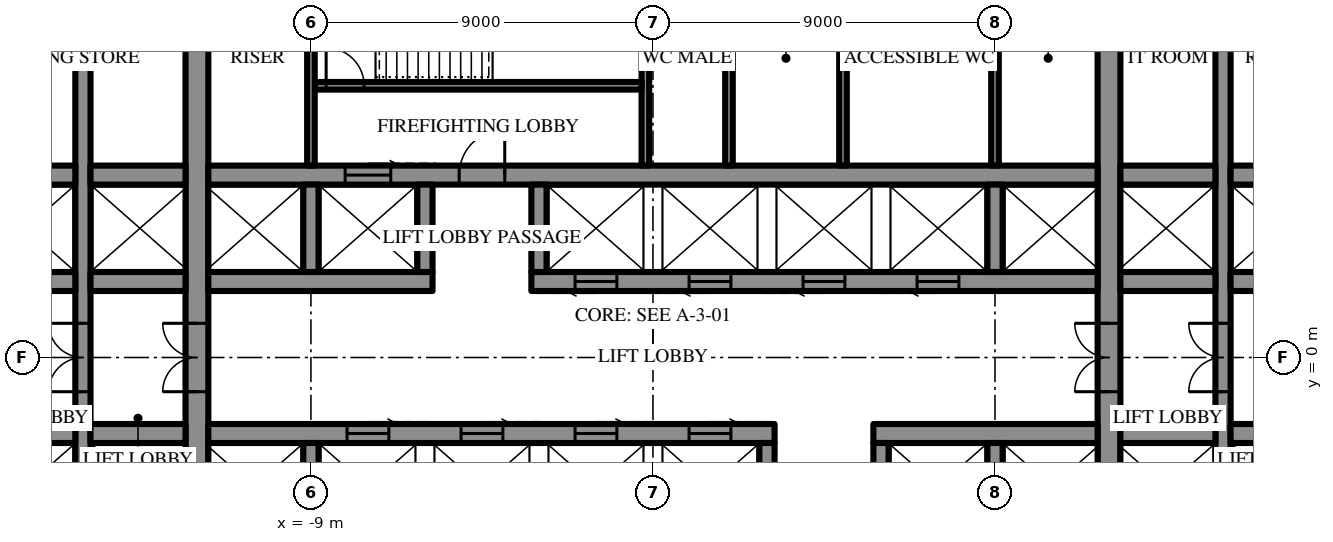
"""IFC4 building model, lengths in metres.
Left out: names, types, materials, properties, quantities, classifications, styles, units other than length and angle.
Written with IfcOpenShell. Run it as: python <this file> out.ifc"""

import sys

from ifc_helpers import new_model, si_unit, direction, frame, frame_2d, origin, place, context, subcontext, project, spatial, rectangle, extrude, element, fill, save


model = new_model("IFC4")
c1 = context("Model", 3, precision=1e-05, world=origin(), true_north=direction((0.0, 1.0)))
c2 = subcontext(c1, "Body", "Model", "MODEL_VIEW")
j1 = project(units=[si_unit("LENGTHUNIT", "METRE"), si_unit("PLANEANGLEUNIT", "RADIAN")], contexts=[c1])
p1 = place(None, origin())
s1 = spatial("IfcSite", under=j1, at=p1, CompositionType="ELEMENT")
p2 = place(p1, origin())
s2 = spatial("IfcBuilding", under=s1, at=p2, CompositionType="ELEMENT")
p3 = place(p2, frame((0.0, 0.0, 65.5)))
s3 = spatial("IfcBuildingStorey", under=s2, at=p3, CompositionType="ELEMENT", Elevation=65.5)
p4 = place(p3, frame((12.0, -10.7, 0.0), z_axis=(0.0, 0.0, 1.0), x_axis=(0.0, 1.0, 0.0)))
e1 = element("IfcWall", 1, at=p4, inside=s3, PredefinedType="SHEAR", context=c2, shape_type="SweptSolid", body=[
    extrude(rectangle(XDim=21.4, YDim=0.6, at=frame_2d((10.7, 0.0))), origin(), (0.0, 0.0, 1.0), 4.2),
])
p5 = place(p4, frame((9.8, 0.0, 0.0)))
e2 = element("IfcOpeningElement", 2, at=p5, cuts=e1, PredefinedType="OPENING", context=c2, shape_type="SweptSolid", body=[
    extrude(rectangle(XDim=1.8, YDim=2.4, at=frame_2d((0.9, 1.2))), frame((0.0, 0.31, 0.0), z_axis=(0.0, -1.0, 0.0), x_axis=(1.0, 0.0, 0.0)), (0.0, 0.0, 1.0), 0.62),
])
p6 = place(p3, frame((-12.0, -10.7, 0.0), z_axis=(0.0, 0.0, 1.0), x_axis=(0.0, 1.0, 0.0)))
e3 = element("IfcWall", 3, at=p6, inside=s3, PredefinedType="SHEAR", context=c2, shape_type="SweptSolid", body=[
    extrude(rectangle(XDim=21.4, YDim=0.6, at=frame_2d((10.7, 0.0))), origin(), (0.0, 0.0, 1.0), 4.2),
])
p7 = place(p6, frame((9.8, 0.0, 0.0)))
e4 = element("IfcOpeningElement", 4, at=p7, cuts=e3, PredefinedType="OPENING", context=c2, shape_type="SweptSolid", body=[
    extrude(rectangle(XDim=1.8, YDim=2.4, at=frame_2d((0.9, 1.2))), frame((0.0, 0.31, 0.0), z_axis=(0.0, -1.0, 0.0), x_axis=(1.0, 0.0, 0.0)), (0.0, 0.0, 1.0), 0.62),
])
p8 = place(p3, frame((15.0, -10.7, 0.0), z_axis=(0.0, 0.0, 1.0), x_axis=(0.0, 1.0, 0.0)))
e5 = element("IfcWall", 5, at=p8, inside=s3, PredefinedType="SHEAR", context=c2, shape_type="SweptSolid", body=[
    extrude(rectangle(XDim=21.4, YDim=0.4, at=frame_2d((10.7, 0.0))), origin(), (0.0, 0.0, 1.0), 4.2),
])
p9 = place(p8, frame((9.8, 0.0, 0.0)))
e6 = element("IfcOpeningElement", 6, at=p9, cuts=e5, PredefinedType="OPENING", context=c2, shape_type="SweptSolid", body=[
    extrude(rectangle(XDim=1.8, YDim=2.4, at=frame_2d((0.9, 1.2))), frame((0.0, 0.21, 0.0), z_axis=(0.0, -1.0, 0.0), x_axis=(1.0, 0.0, 0.0)), (0.0, 0.0, 1.0), 0.42),
])
p10 = place(p3, frame((-15.0, -10.7, 0.0), z_axis=(0.0, 0.0, 1.0), x_axis=(0.0, 1.0, 0.0)))
e7 = element("IfcWall", 7, at=p10, inside=s3, PredefinedType="SHEAR", context=c2, shape_type="SweptSolid", body=[
    extrude(rectangle(XDim=21.4, YDim=0.4, at=frame_2d((10.7, 0.0))), origin(), (0.0, 0.0, 1.0), 4.2),
])
p11 = place(p10, frame((9.8, 0.0, 0.0)))
e8 = element("IfcOpeningElement", 8, at=p11, cuts=e7, PredefinedType="OPENING", context=c2, shape_type="SweptSolid", body=[
    extrude(rectangle(XDim=1.8, YDim=2.4, at=frame_2d((0.9, 1.2))), frame((0.0, 0.21, 0.0), z_axis=(0.0, -1.0, 0.0), x_axis=(1.0, 0.0, 0.0)), (0.0, 0.0, 1.0), 0.42),
])
p12 = place(p3, frame((-17.4, 2.0, 0.0), z_axis=(0.0, 0.0, 1.0), x_axis=(1.0, 0.0, 0.0)))
e9 = element("IfcWall", 9, at=p12, inside=s3, PredefinedType="SHEAR", context=c2, shape_type="SweptSolid", body=[
    extrude(rectangle(XDim=2.2, YDim=0.5, at=frame_2d((1.1, 0.0))), origin(), (0.0, 0.0, 1.0), 4.2),
])
p13 = place(p3, frame((-14.8, 2.0, 0.0), z_axis=(0.0, 0.0, 1.0), x_axis=(1.0, 0.0, 0.0)))
e10 = element("IfcWall", 10, at=p13, inside=s3, PredefinedType="SHEAR", context=c2, shape_type="SweptSolid", body=[
    extrude(rectangle(XDim=2.5, YDim=0.5, at=frame_2d((1.25, 0.0))), origin(), (0.0, 0.0, 1.0), 4.2),
])
p14 = place(p3, frame((-11.7, 2.0, 0.0), z_axis=(0.0, 0.0, 1.0), x_axis=(1.0, 0.0, 0.0)))
e11 = element("IfcWall", 11, at=p14, inside=s3, PredefinedType="SHEAR", context=c2, shape_type="SweptSolid", body=[
    extrude(rectangle(XDim=5.9, YDim=0.5, at=frame_2d((2.95, 0.0))), origin(), (0.0, 0.0, 1.0), 4.2),
])
p15 = place(p3, frame((-3.2, 2.0, 0.0), z_axis=(0.0, 0.0, 1.0), x_axis=(1.0, 0.0, 0.0)))
e12 = element("IfcWall", 12, at=p15, inside=s3, PredefinedType="SHEAR", context=c2, shape_type="SweptSolid", body=[
    extrude(rectangle(XDim=14.9, YDim=0.5, at=frame_2d((7.45, 0.0))), origin(), (0.0, 0.0, 1.0), 4.2),
])
p16 = place(p15, frame((1.15, 0.0, 0.0)))
e13 = element("IfcOpeningElement", 13, at=p16, cuts=e12, PredefinedType="OPENING", context=c2, shape_type="SweptSolid", body=[
    extrude(rectangle(XDim=1.1, YDim=2.2, at=frame_2d((0.55, 1.1))), frame((0.0, 0.26, 0.0), z_axis=(0.0, -1.0, 0.0), x_axis=(1.0, 0.0, 0.0)), (0.0, 0.0, 1.0), 0.52),
])
p17 = place(p15, frame((4.15, 0.0, 0.0)))
e14 = element("IfcOpeningElement", 14, at=p17, cuts=e12, PredefinedType="OPENING", context=c2, shape_type="SweptSolid", body=[
    extrude(rectangle(XDim=1.1, YDim=2.2, at=frame_2d((0.55, 1.1))), frame((0.0, 0.26, 0.0), z_axis=(0.0, -1.0, 0.0), x_axis=(1.0, 0.0, 0.0)), (0.0, 0.0, 1.0), 0.52),
])
p18 = place(p15, frame((7.15, 0.0, 0.0)))
e15 = element("IfcOpeningElement", 15, at=p18, cuts=e12, PredefinedType="OPENING", context=c2, shape_type="SweptSolid", body=[
    extrude(rectangle(XDim=1.1, YDim=2.2, at=frame_2d((0.55, 1.1))), frame((0.0, 0.26, 0.0), z_axis=(0.0, -1.0, 0.0), x_axis=(1.0, 0.0, 0.0)), (0.0, 0.0, 1.0), 0.52),
])
p19 = place(p15, frame((10.15, 0.0, 0.0)))
e16 = element("IfcOpeningElement", 16, at=p19, cuts=e12, PredefinedType="OPENING", context=c2, shape_type="SweptSolid", body=[
    extrude(rectangle(XDim=1.1, YDim=2.2, at=frame_2d((0.55, 1.1))), frame((0.0, 0.26, 0.0), z_axis=(0.0, -1.0, 0.0), x_axis=(1.0, 0.0, 0.0)), (0.0, 0.0, 1.0), 0.52),
])
p20 = place(p3, frame((12.3, 2.0, 0.0), z_axis=(0.0, 0.0, 1.0), x_axis=(1.0, 0.0, 0.0)))
e17 = element("IfcWall", 17, at=p20, inside=s3, PredefinedType="SHEAR", context=c2, shape_type="SweptSolid", body=[
    extrude(rectangle(XDim=2.5, YDim=0.5, at=frame_2d((1.25, 0.0))), origin(), (0.0, 0.0, 1.0), 4.2),
])
for number, where, z_axis, x_axis in (
    (18, (15.2, 2.0, 0.0), (0.0, 0.0, 1.0), (1.0, 0.0, 0.0)),
    (19, (-17.4, 4.8, 0.0), (0.0, 0.0, 1.0), (1.0, 0.0, 0.0)),
):
    element("IfcWall", number, at=place(p3, frame(where, z_axis=z_axis, x_axis=x_axis)), inside=s3, PredefinedType="SHEAR", context=c2, shape_type="SweptSolid", body=[
        extrude(rectangle(XDim=2.2, YDim=0.5, at=frame_2d((1.1, 0.0))), origin(), (0.0, 0.0, 1.0), 4.2),
    ])
p21 = place(p3, frame((-14.8, 4.8, 0.0), z_axis=(0.0, 0.0, 1.0), x_axis=(1.0, 0.0, 0.0)))
e20 = element("IfcWall", 20, at=p21, inside=s3, PredefinedType="SHEAR", context=c2, shape_type="SweptSolid", body=[
    extrude(rectangle(XDim=2.5, YDim=0.5, at=frame_2d((1.25, 0.0))), origin(), (0.0, 0.0, 1.0), 4.2),
])
p22 = place(p3, frame((-11.7, 4.8, 0.0), z_axis=(0.0, 0.0, 1.0), x_axis=(1.0, 0.0, 0.0)))
e21 = element("IfcWall", 21, at=p22, inside=s3, PredefinedType="SHEAR", context=c2, shape_type="SweptSolid", body=[
    extrude(rectangle(XDim=23.4, YDim=0.5, at=frame_2d((11.7, 0.0))), origin(), (0.0, 0.0, 1.0), 4.2),
])
p23 = place(p22, frame((6.6, 0.0, 0.0)))
e22 = element("IfcOpeningElement", 22, at=p23, cuts=e21, PredefinedType="OPENING", context=c2, shape_type="SweptSolid", body=[
    extrude(rectangle(XDim=1.2, YDim=2.2, at=frame_2d((0.6, 1.1))), frame((0.0, 0.26, 0.0), z_axis=(0.0, -1.0, 0.0), x_axis=(1.0, 0.0, 0.0)), (0.0, 0.0, 1.0), 0.52),
])
p24 = place(p22, frame((3.6, 0.0, 0.0)))
e23 = element("IfcOpeningElement", 23, at=p24, cuts=e21, PredefinedType="OPENING", context=c2, shape_type="SweptSolid", body=[
    extrude(rectangle(XDim=1.2, YDim=2.2, at=frame_2d((0.6, 1.1))), frame((0.0, 0.26, 0.0), z_axis=(0.0, -1.0, 0.0), x_axis=(1.0, 0.0, 0.0)), (0.0, 0.0, 1.0), 0.52),
])
p25 = place(p3, frame((12.3, 4.8, 0.0), z_axis=(0.0, 0.0, 1.0), x_axis=(1.0, 0.0, 0.0)))
e24 = element("IfcWall", 24, at=p25, inside=s3, PredefinedType="SHEAR", context=c2, shape_type="SweptSolid", body=[
    extrude(rectangle(XDim=2.5, YDim=0.5, at=frame_2d((1.25, 0.0))), origin(), (0.0, 0.0, 1.0), 4.2),
])
p26 = place(p3, frame((15.2, 4.8, 0.0), z_axis=(0.0, 0.0, 1.0), x_axis=(1.0, 0.0, 0.0)))
e25 = element("IfcWall", 25, at=p26, inside=s3, PredefinedType="SHEAR", context=c2, shape_type="SweptSolid", body=[
    extrude(rectangle(XDim=2.2, YDim=0.5, at=frame_2d((1.1, 0.0))), origin(), (0.0, 0.0, 1.0), 4.2),
])
for number, where, z_axis, x_axis in (
    (26, (-9.0, 2.25, 0.0), (0.0, 0.0, 1.0), (0.0, 1.0, 0.0)),
    (27, (-6.0, 2.25, 0.0), (0.0, 0.0, 1.0), (0.0, 1.0, 0.0)),
    (28, (-3.0, 2.25, 0.0), (0.0, 0.0, 1.0), (0.0, 1.0, 0.0)),
    (29, (9.0, 2.25, 0.0), (0.0, 0.0, 1.0), (0.0, 1.0, 0.0)),
):
    element("IfcWall", number, at=place(p3, frame(where, z_axis=z_axis, x_axis=x_axis)), inside=s3, PredefinedType="SHEAR", context=c2, shape_type="SweptSolid", body=[
        extrude(rectangle(XDim=2.3, YDim=0.4, at=frame_2d((1.15, 0.0))), origin(), (0.0, 0.0, 1.0), 4.2),
    ])
p27 = place(p3, frame((-0.2, 5.05, 0.0), z_axis=(0.0, 0.0, 1.0), x_axis=(0.0, 1.0, 0.0)))
e30 = element("IfcWall", 30, at=p27, inside=s3, PredefinedType="SHEAR", context=c2, shape_type="SweptSolid", body=[
    extrude(rectangle(XDim=5.65, YDim=0.2, at=frame_2d((2.825, 0.0))), origin(), (0.0, 0.0, 1.0), 4.2),
])
p28 = place(p3, frame((-8.9, 7.15, 0.0), z_axis=(0.0, 0.0, 1.0), x_axis=(1.0, 0.0, 0.0)))
e31 = element("IfcWall", 31, at=p28, inside=s3, PredefinedType="SHEAR", context=c2, shape_type="SweptSolid", body=[
    extrude(rectangle(XDim=8.6, YDim=0.2, at=frame_2d((4.3, 0.0))), origin(), (0.0, 0.0, 1.0), 4.2),
])
p29 = place(p28, frame((0.3, 0.0, 0.0)))
e32 = element("IfcOpeningElement", 32, at=p29, cuts=e31, PredefinedType="OPENING", context=c2, shape_type="SweptSolid", body=[
    extrude(rectangle(XDim=1.0, YDim=2.2, at=frame_2d((0.5, 1.1))), frame((0.0, 0.11, 0.0), z_axis=(0.0, -1.0, 0.0), x_axis=(1.0, 0.0, 0.0)), (0.0, 0.0, 1.0), 0.22),
])
p30 = place(p3, frame((17.4, -2.0, 0.0), z_axis=(0.0, 0.0, 1.0), x_axis=(-1.0, 0.0, 0.0)))
e33 = element("IfcWall", 33, at=p30, inside=s3, PredefinedType="SHEAR", context=c2, shape_type="SweptSolid", body=[
    extrude(rectangle(XDim=2.2, YDim=0.5, at=frame_2d((1.1, 0.0))), origin(), (0.0, 0.0, 1.0), 4.2),
])
p31 = place(p3, frame((14.8, -2.0, 0.0), z_axis=(0.0, 0.0, 1.0), x_axis=(-1.0, 0.0, 0.0)))
e34 = element("IfcWall", 34, at=p31, inside=s3, PredefinedType="SHEAR", context=c2, shape_type="SweptSolid", body=[
    extrude(rectangle(XDim=2.5, YDim=0.5, at=frame_2d((1.25, 0.0))), origin(), (0.0, 0.0, 1.0), 4.2),
])
p32 = place(p3, frame((11.7, -2.0, 0.0), z_axis=(0.0, 0.0, 1.0), x_axis=(-1.0, 0.0, 0.0)))
e35 = element("IfcWall", 35, at=p32, inside=s3, PredefinedType="SHEAR", context=c2, shape_type="SweptSolid", body=[
    extrude(rectangle(XDim=5.9, YDim=0.5, at=frame_2d((2.95, 0.0))), origin(), (0.0, 0.0, 1.0), 4.2),
])
p33 = place(p3, frame((3.2, -2.0, 0.0), z_axis=(0.0, 0.0, 1.0), x_axis=(-1.0, 0.0, 0.0)))
e36 = element("IfcWall", 36, at=p33, inside=s3, PredefinedType="SHEAR", context=c2, shape_type="SweptSolid", body=[
    extrude(rectangle(XDim=14.9, YDim=0.5, at=frame_2d((7.45, 0.0))), origin(), (0.0, 0.0, 1.0), 4.2),
])
p34 = place(p33, frame((1.15, 0.0, 0.0)))
e37 = element("IfcOpeningElement", 37, at=p34, cuts=e36, PredefinedType="OPENING", context=c2, shape_type="SweptSolid", body=[
    extrude(rectangle(XDim=1.1, YDim=2.2, at=frame_2d((0.55, 1.1))), frame((0.0, 0.26, 0.0), z_axis=(0.0, -1.0, 0.0), x_axis=(1.0, 0.0, 0.0)), (0.0, 0.0, 1.0), 0.52),
])
p35 = place(p33, frame((4.15, 0.0, 0.0)))
e38 = element("IfcOpeningElement", 38, at=p35, cuts=e36, PredefinedType="OPENING", context=c2, shape_type="SweptSolid", body=[
    extrude(rectangle(XDim=1.1, YDim=2.2, at=frame_2d((0.55, 1.1))), frame((0.0, 0.26, 0.0), z_axis=(0.0, -1.0, 0.0), x_axis=(1.0, 0.0, 0.0)), (0.0, 0.0, 1.0), 0.52),
])
p36 = place(p33, frame((7.15, 0.0, 0.0)))
e39 = element("IfcOpeningElement", 39, at=p36, cuts=e36, PredefinedType="OPENING", context=c2, shape_type="SweptSolid", body=[
    extrude(rectangle(XDim=1.1, YDim=2.2, at=frame_2d((0.55, 1.1))), frame((0.0, 0.26, 0.0), z_axis=(0.0, -1.0, 0.0), x_axis=(1.0, 0.0, 0.0)), (0.0, 0.0, 1.0), 0.52),
])
p37 = place(p33, frame((10.15, 0.0, 0.0)))
e40 = element("IfcOpeningElement", 40, at=p37, cuts=e36, PredefinedType="OPENING", context=c2, shape_type="SweptSolid", body=[
    extrude(rectangle(XDim=1.1, YDim=2.2, at=frame_2d((0.55, 1.1))), frame((0.0, 0.26, 0.0), z_axis=(0.0, -1.0, 0.0), x_axis=(1.0, 0.0, 0.0)), (0.0, 0.0, 1.0), 0.52),
])
p38 = place(p3, frame((-12.3, -2.0, 0.0), z_axis=(0.0, 0.0, 1.0), x_axis=(-1.0, 0.0, 0.0)))
e41 = element("IfcWall", 41, at=p38, inside=s3, PredefinedType="SHEAR", context=c2, shape_type="SweptSolid", body=[
    extrude(rectangle(XDim=2.5, YDim=0.5, at=frame_2d((1.25, 0.0))), origin(), (0.0, 0.0, 1.0), 4.2),
])
p39 = place(p3, frame((-15.2, -2.0, 0.0), z_axis=(0.0, 0.0, 1.0), x_axis=(-1.0, 0.0, 0.0)))
e42 = element("IfcWall", 42, at=p39, inside=s3, PredefinedType="SHEAR", context=c2, shape_type="SweptSolid", body=[
    extrude(rectangle(XDim=2.2, YDim=0.5, at=frame_2d((1.1, 0.0))), origin(), (0.0, 0.0, 1.0), 4.2),
])
for number, where, z_axis, x_axis in (
    (43, (9.0, -2.25, 0.0), (0.0, 0.0, 1.0), (0.0, -1.0, 0.0)),
    (44, (6.0, -2.25, 0.0), (0.0, 0.0, 1.0), (0.0, -1.0, 0.0)),
    (45, (3.0, -2.25, 0.0), (0.0, 0.0, 1.0), (0.0, -1.0, 0.0)),
    (46, (-9.0, -2.25, 0.0), (0.0, 0.0, 1.0), (0.0, -1.0, 0.0)),
):
    element("IfcWall", number, at=place(p3, frame(where, z_axis=z_axis, x_axis=x_axis)), inside=s3, PredefinedType="SHEAR", context=c2, shape_type="SweptSolid", body=[
        extrude(rectangle(XDim=2.3, YDim=0.4, at=frame_2d((1.15, 0.0))), origin(), (0.0, 0.0, 1.0), 4.2),
    ])
for number, where, z_axis, x_axis in (
    (47, (-9.0, 5.05, 0.0), (0.0, 0.0, 1.0), (0.0, 1.0, 0.0)),
    (48, (9.0, 5.05, 0.0), (0.0, 0.0, 1.0), (0.0, 1.0, 0.0)),
    (49, (2.0, 5.05, 0.0), (0.0, 0.0, 1.0), (0.0, 1.0, 0.0)),
    (50, (5.0, 5.05, 0.0), (0.0, 0.0, 1.0), (0.0, 1.0, 0.0)),
):
    element("IfcWall", number, at=place(p3, frame(where, z_axis=z_axis, x_axis=x_axis)), inside=s3, PredefinedType="PARTITIONING", context=c2, shape_type="SweptSolid", body=[
        extrude(rectangle(XDim=5.65, YDim=0.2, at=frame_2d((2.825, 0.0))), origin(), (0.0, 0.0, 1.0), 4.0),
    ])
p40 = place(p23, origin())
e51 = element("IfcDoor", 51, at=p40, inside=s3, OperationType="SINGLE_SWING_LEFT", PredefinedType="DOOR", context=c2, shape_type="SweptSolid", body=[
    extrude(rectangle(XDim=1.2, YDim=2.2, at=frame_2d((0.6, 1.1))), frame((0.0, 0.025, 0.0), z_axis=(0.0, -1.0, 0.0), x_axis=(1.0, 0.0, 0.0)), (0.0, 0.0, 1.0), 0.05),
])
fill(e22, e51)
p41 = place(p29, origin())
e52 = element("IfcDoor", 52, at=p41, inside=s3, OperationType="SINGLE_SWING_RIGHT", PredefinedType="DOOR", context=c2, shape_type="SweptSolid", body=[
    extrude(rectangle(XDim=1.0, YDim=2.2, at=frame_2d((0.5, 1.1))), frame((0.0, 0.025, 0.0), z_axis=(0.0, -1.0, 0.0), x_axis=(1.0, 0.0, 0.0)), (0.0, 0.0, 1.0), 0.05),
])
fill(e32, e52)
p42 = place(p5, origin())
e53 = element("IfcDoor", 53, at=p42, inside=s3, OperationType="DOUBLE_DOOR_SINGLE_SWING", PredefinedType="DOOR", context=c2, shape_type="SweptSolid", body=[
    extrude(rectangle(XDim=1.8, YDim=2.4, at=frame_2d((0.9, 1.2))), frame((0.0, 0.025, 0.0), z_axis=(0.0, -1.0, 0.0), x_axis=(1.0, 0.0, 0.0)), (0.0, 0.0, 1.0), 0.05),
])
fill(e2, e53)
p43 = place(p7, origin())
e54 = element("IfcDoor", 54, at=p43, inside=s3, OperationType="DOUBLE_DOOR_SINGLE_SWING", PredefinedType="DOOR", context=c2, shape_type="SweptSolid", body=[
    extrude(rectangle(XDim=1.8, YDim=2.4, at=frame_2d((0.9, 1.2))), frame((0.0, 0.025, 0.0), z_axis=(0.0, -1.0, 0.0), x_axis=(1.0, 0.0, 0.0)), (0.0, 0.0, 1.0), 0.05),
])
fill(e4, e54)
p44 = place(p9, origin())
e55 = element("IfcDoor", 55, at=p44, inside=s3, OperationType="DOUBLE_DOOR_SINGLE_SWING", PredefinedType="DOOR", context=c2, shape_type="SweptSolid", body=[
    extrude(rectangle(XDim=1.8, YDim=2.4, at=frame_2d((0.9, 1.2))), frame((0.0, 0.025, 0.0), z_axis=(0.0, -1.0, 0.0), x_axis=(1.0, 0.0, 0.0)), (0.0, 0.0, 1.0), 0.05),
])
fill(e6, e55)
p45 = place(p11, origin())
e56 = element("IfcDoor", 56, at=p45, inside=s3, OperationType="DOUBLE_DOOR_SINGLE_SWING", PredefinedType="DOOR", context=c2, shape_type="SweptSolid", body=[
    extrude(rectangle(XDim=1.8, YDim=2.4, at=frame_2d((0.9, 1.2))), frame((0.0, 0.025, 0.0), z_axis=(0.0, -1.0, 0.0), x_axis=(1.0, 0.0, 0.0)), (0.0, 0.0, 1.0), 0.05),
])
fill(e8, e56)
p46 = place(p24, origin())
e57 = element("IfcDoor", 57, at=p46, inside=s3, OperationType="SLIDING_TO_LEFT", PredefinedType="DOOR", context=c2, shape_type="SweptSolid", body=[
    extrude(rectangle(XDim=1.2, YDim=2.2, at=frame_2d((0.6, 1.1))), frame((0.0, 0.025, 0.0), z_axis=(0.0, -1.0, 0.0), x_axis=(1.0, 0.0, 0.0)), (0.0, 0.0, 1.0), 0.05),
])
fill(e23, e57)
p47 = place(p16, frame((1.1, 0.0, 0.0), z_axis=(0.0, 0.0, 1.0), x_axis=(-1.0, 0.0, 0.0)))
e58 = element("IfcDoor", 58, at=p47, inside=s3, OperationType="SLIDING_TO_LEFT", PredefinedType="DOOR", context=c2, shape_type="SweptSolid", body=[
    extrude(rectangle(XDim=1.1, YDim=2.2, at=frame_2d((0.55, 1.1))), frame((0.0, 0.025, 0.0), z_axis=(0.0, -1.0, 0.0), x_axis=(1.0, 0.0, 0.0)), (0.0, 0.0, 1.0), 0.05),
])
fill(e13, e58)
p48 = place(p17, frame((1.1, 0.0, 0.0), z_axis=(0.0, 0.0, 1.0), x_axis=(-1.0, 0.0, 0.0)))
e59 = element("IfcDoor", 59, at=p48, inside=s3, OperationType="SLIDING_TO_LEFT", PredefinedType="DOOR", context=c2, shape_type="SweptSolid", body=[
    extrude(rectangle(XDim=1.1, YDim=2.2, at=frame_2d((0.55, 1.1))), frame((0.0, 0.025, 0.0), z_axis=(0.0, -1.0, 0.0), x_axis=(1.0, 0.0, 0.0)), (0.0, 0.0, 1.0), 0.05),
])
fill(e14, e59)
p49 = place(p18, frame((1.1, 0.0, 0.0), z_axis=(0.0, 0.0, 1.0), x_axis=(-1.0, 0.0, 0.0)))
e60 = element("IfcDoor", 60, at=p49, inside=s3, OperationType="SLIDING_TO_LEFT", PredefinedType="DOOR", context=c2, shape_type="SweptSolid", body=[
    extrude(rectangle(XDim=1.1, YDim=2.2, at=frame_2d((0.55, 1.1))), frame((0.0, 0.025, 0.0), z_axis=(0.0, -1.0, 0.0), x_axis=(1.0, 0.0, 0.0)), (0.0, 0.0, 1.0), 0.05),
])
fill(e15, e60)
p50 = place(p19, frame((1.1, 0.0, 0.0), z_axis=(0.0, 0.0, 1.0), x_axis=(-1.0, 0.0, 0.0)))
e61 = element("IfcDoor", 61, at=p50, inside=s3, OperationType="SLIDING_TO_LEFT", PredefinedType="DOOR", context=c2, shape_type="SweptSolid", body=[
    extrude(rectangle(XDim=1.1, YDim=2.2, at=frame_2d((0.55, 1.1))), frame((0.0, 0.025, 0.0), z_axis=(0.0, -1.0, 0.0), x_axis=(1.0, 0.0, 0.0)), (0.0, 0.0, 1.0), 0.05),
])
fill(e16, e61)
p51 = place(p34, frame((1.1, 0.0, 0.0), z_axis=(0.0, 0.0, 1.0), x_axis=(-1.0, 0.0, 0.0)))
e62 = element("IfcDoor", 62, at=p51, inside=s3, OperationType="SLIDING_TO_LEFT", PredefinedType="DOOR", context=c2, shape_type="SweptSolid", body=[
    extrude(rectangle(XDim=1.1, YDim=2.2, at=frame_2d((0.55, 1.1))), frame((0.0, 0.025, 0.0), z_axis=(0.0, -1.0, 0.0), x_axis=(1.0, 0.0, 0.0)), (0.0, 0.0, 1.0), 0.05),
])
fill(e37, e62)
p52 = place(p35, frame((1.1, 0.0, 0.0), z_axis=(0.0, 0.0, 1.0), x_axis=(-1.0, 0.0, 0.0)))
e63 = element("IfcDoor", 63, at=p52, inside=s3, OperationType="SLIDING_TO_LEFT", PredefinedType="DOOR", context=c2, shape_type="SweptSolid", body=[
    extrude(rectangle(XDim=1.1, YDim=2.2, at=frame_2d((0.55, 1.1))), frame((0.0, 0.025, 0.0), z_axis=(0.0, -1.0, 0.0), x_axis=(1.0, 0.0, 0.0)), (0.0, 0.0, 1.0), 0.05),
])
fill(e38, e63)
p53 = place(p36, frame((1.1, 0.0, 0.0), z_axis=(0.0, 0.0, 1.0), x_axis=(-1.0, 0.0, 0.0)))
e64 = element("IfcDoor", 64, at=p53, inside=s3, OperationType="SLIDING_TO_LEFT", PredefinedType="DOOR", context=c2, shape_type="SweptSolid", body=[
    extrude(rectangle(XDim=1.1, YDim=2.2, at=frame_2d((0.55, 1.1))), frame((0.0, 0.025, 0.0), z_axis=(0.0, -1.0, 0.0), x_axis=(1.0, 0.0, 0.0)), (0.0, 0.0, 1.0), 0.05),
])
fill(e39, e64)
p54 = place(p37, frame((1.1, 0.0, 0.0), z_axis=(0.0, 0.0, 1.0), x_axis=(-1.0, 0.0, 0.0)))
e65 = element("IfcDoor", 65, at=p54, inside=s3, OperationType="SLIDING_TO_LEFT", PredefinedType="DOOR", context=c2, shape_type="SweptSolid", body=[
    extrude(rectangle(XDim=1.1, YDim=2.2, at=frame_2d((0.55, 1.1))), frame((0.0, 0.025, 0.0), z_axis=(0.0, -1.0, 0.0), x_axis=(1.0, 0.0, 0.0)), (0.0, 0.0, 1.0), 0.05),
])
fill(e40, e65)
save(model, sys.argv[1])
